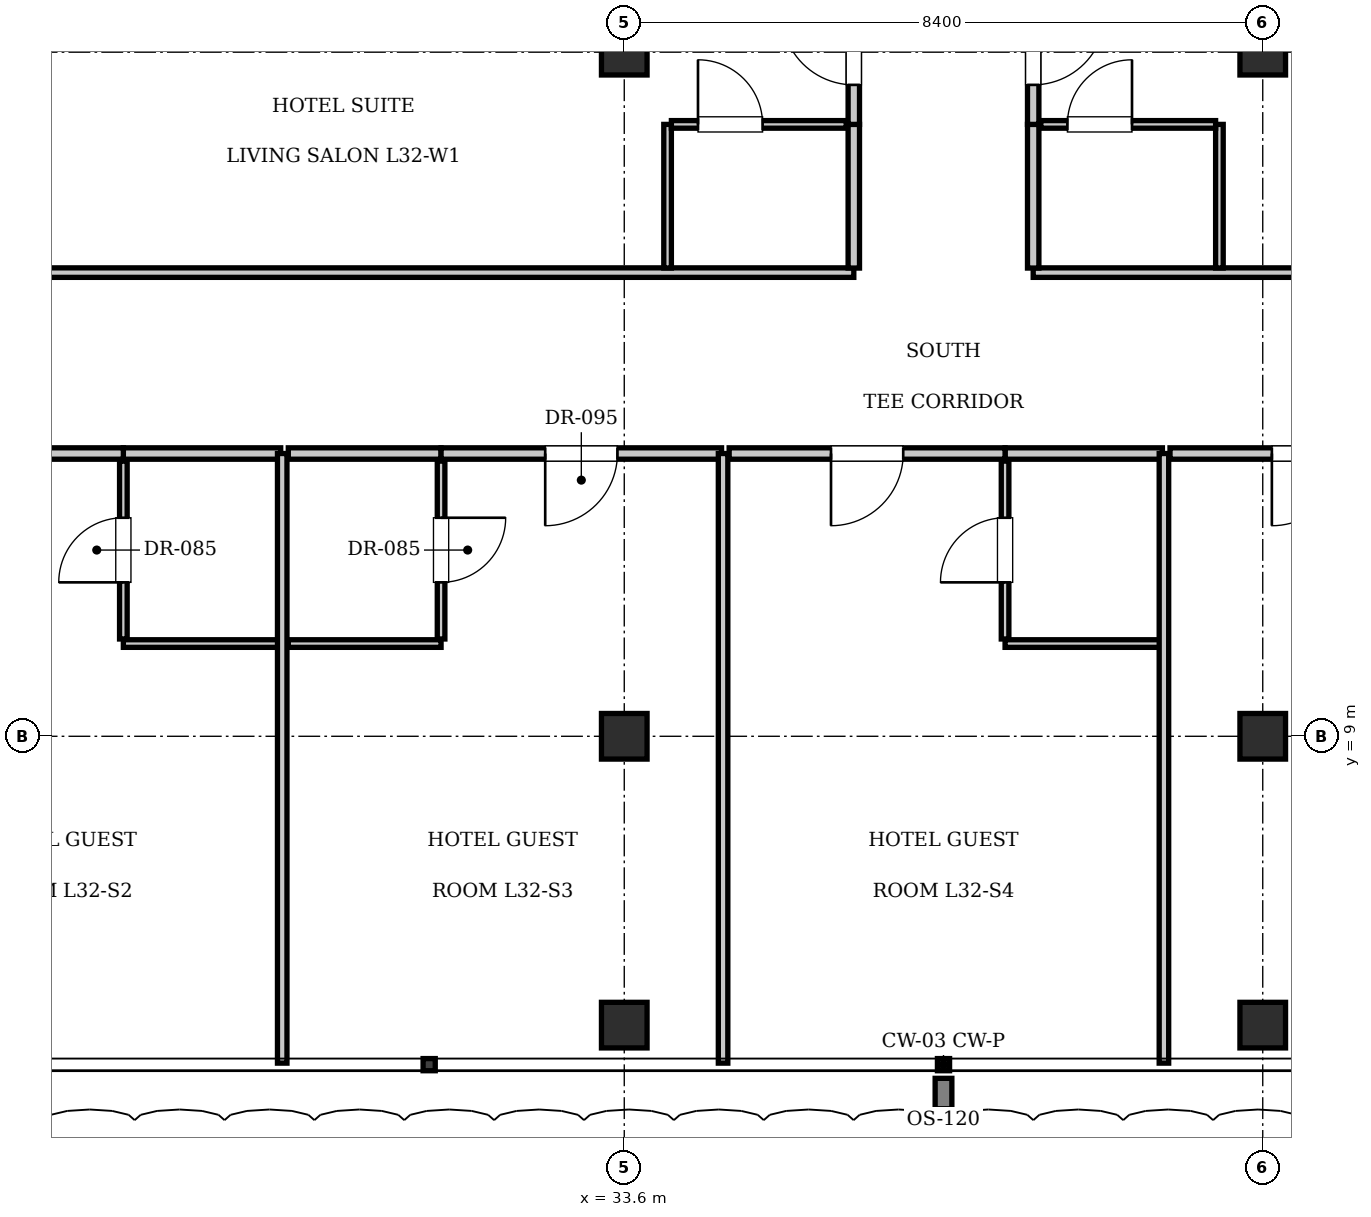
"""IFC4 building model, lengths in metres.
Left out: names, types, materials, properties, quantities, classifications, styles, units other than length and angle.
Written with IfcOpenShell. Run it as: python <this file> out.ifc"""

import sys

from ifc_helpers import new_model, si_unit, direction, frame, frame_2d, origin, origin_2d, place, context, subcontext, project, spatial, rectangle, i_section, extrude, element, fill, save


model = new_model("IFC4")
c1 = context("Model", 3, precision=1e-05, world=origin(), true_north=direction((0.0, 1.0)))
c2 = subcontext(c1, "Body", "Model", "MODEL_VIEW")
j1 = project(units=[si_unit("LENGTHUNIT", "METRE"), si_unit("PLANEANGLEUNIT", "RADIAN")], contexts=[c1])
p1 = place(None, origin())
s1 = spatial("IfcSite", under=j1, at=p1, CompositionType="ELEMENT")
p2 = place(p1, origin())
s2 = spatial("IfcBuilding", under=s1, at=p2, CompositionType="ELEMENT")
p3 = place(p2, frame((0.0, 0.0, 135.1)))
s3 = spatial("IfcBuildingStorey", under=s2, at=p3, CompositionType="ELEMENT", Elevation=135.1)
for number, where, z_axis, x_axis in (
    (1, (33.6, 9.0, 0.0), (0.0, 0.0, 1.0), (1.0, 0.0, 0.0)),
    (2, (42.0, 9.0, 0.0), (0.0, 0.0, 1.0), (1.0, 0.0, 0.0)),
    (3, (33.6, 18.0, 0.0), (0.0, 0.0, 1.0), (1.0, 0.0, 0.0)),
    (4, (42.0, 18.0, 0.0), (0.0, 0.0, 1.0), (1.0, 0.0, 0.0)),
    (5, (33.6, 5.2, 0.0), (0.0, 0.0, 1.0), (1.0, 0.0, 0.0)),
    (6, (42.0, 5.2, 0.0), (0.0, 0.0, 1.0), (1.0, 0.0, 0.0)),
):
    element("IfcColumn", number, at=place(p3, frame(where, z_axis=z_axis, x_axis=x_axis)), inside=s3, PredefinedType="COLUMN", context=c2, shape_type="SweptSolid", body=[
        extrude(i_section(OverallWidth=0.6, OverallDepth=0.6, WebThickness=0.025, FlangeThickness=0.038, at=origin_2d()), origin(), (0.0, 0.0, 1.0), 3.85),
    ])
p4 = place(p3, frame((27.01, 12.72, 0.0), z_axis=(0.0, 0.0, 1.0), x_axis=(1.0, 0.0, 0.0)))
e7 = element("IfcWall", 7, at=p4, inside=s3, PredefinedType="PARTITIONING", context=c2, shape_type="SweptSolid", body=[
    extrude(rectangle(XDim=2.07, YDim=0.15, at=frame_2d((1.035, 0.0))), origin(), (0.0, 0.0, 1.0), 3.61),
])
p5 = place(p3, frame((27.01, 10.22, 0.0), z_axis=(0.0, 0.0, 1.0), x_axis=(1.0, 0.0, 0.0)))
e8 = element("IfcWall", 8, at=p5, inside=s3, PredefinedType="PARTITIONING", context=c2, shape_type="SweptSolid", body=[
    extrude(rectangle(XDim=2.05, YDim=0.1, at=frame_2d((1.025, 0.0))), origin(), (0.0, 0.0, 1.0), 3.61),
])
p6 = place(p3, frame((27.01, 10.28, 0.0), z_axis=(0.0, 0.0, 1.0), x_axis=(0.0, 1.0, 0.0)))
e9 = element("IfcWall", 9, at=p6, inside=s3, PredefinedType="PARTITIONING", context=c2, shape_type="SweptSolid", body=[
    extrude(rectangle(XDim=2.34, YDim=0.1, at=frame_2d((1.17, 0.0))), origin(), (0.0, 0.0, 1.0), 3.61),
])
p7 = place(p6, frame((0.745, 0.0, 0.0)))
e10 = element("IfcOpeningElement", 10, at=p7, cuts=e9, PredefinedType="OPENING", context=c2, shape_type="SweptSolid", body=[
    extrude(rectangle(XDim=0.85, YDim=2.1, at=frame_2d((0.425, 1.05))), frame((0.0, 0.06, 0.0), z_axis=(0.0, -1.0, 0.0), x_axis=(1.0, 0.0, 0.0)), (0.0, 0.0, 1.0), 0.12),
])
p8 = place(p3, frame((23.38, 12.72, 0.0), z_axis=(0.0, 0.0, 1.0), x_axis=(1.0, 0.0, 0.0)))
e11 = element("IfcWall", 11, at=p8, inside=s3, PredefinedType="PARTITIONING", context=c2, shape_type="SweptSolid", body=[
    extrude(rectangle(XDim=3.63, YDim=0.15, at=frame_2d((1.815, 0.0))), origin(), (0.0, 0.0, 1.0), 3.61),
])
p9 = place(p8, frame((1.34, 0.0, 0.0)))
e12 = element("IfcOpeningElement", 12, at=p9, cuts=e11, PredefinedType="OPENING", context=c2, shape_type="SweptSolid", body=[
    extrude(rectangle(XDim=0.95, YDim=2.15, at=frame_2d((0.475, 1.075))), frame((0.0, 0.085, 0.0), z_axis=(0.0, -1.0, 0.0), x_axis=(1.0, 0.0, 0.0)), (0.0, 0.0, 1.0), 0.17),
])
p10 = place(p3, frame((29.1, 4.7, 0.0), z_axis=(0.0, 0.0, 1.0), x_axis=(0.0, 1.0, 0.0)))
e13 = element("IfcWall", 13, at=p10, inside=s3, PredefinedType="PARTITIONING", context=c2, shape_type="SweptSolid", body=[
    extrude(rectangle(XDim=8.02, YDim=0.125, at=frame_2d((4.01, 0.0))), origin(), (0.0, 0.0, 1.0), 3.61),
])
p11 = place(p3, frame((29.18, 12.72, 0.0), z_axis=(0.0, 0.0, 1.0), x_axis=(1.0, 0.0, 0.0)))
e14 = element("IfcWall", 14, at=p11, inside=s3, PredefinedType="PARTITIONING", context=c2, shape_type="SweptSolid", body=[
    extrude(rectangle(XDim=2.01, YDim=0.15, at=frame_2d((1.005, 0.0))), origin(), (0.0, 0.0, 1.0), 3.61),
])
p12 = place(p3, frame((29.18, 10.22, 0.0), z_axis=(0.0, 0.0, 1.0), x_axis=(1.0, 0.0, 0.0)))
e15 = element("IfcWall", 15, at=p12, inside=s3, PredefinedType="PARTITIONING", context=c2, shape_type="SweptSolid", body=[
    extrude(rectangle(XDim=2.01, YDim=0.1, at=frame_2d((1.005, 0.0))), origin(), (0.0, 0.0, 1.0), 3.61),
])
p13 = place(p3, frame((31.19, 10.28, 0.0), z_axis=(0.0, 0.0, 1.0), x_axis=(0.0, 1.0, 0.0)))
e16 = element("IfcWall", 16, at=p13, inside=s3, PredefinedType="PARTITIONING", context=c2, shape_type="SweptSolid", body=[
    extrude(rectangle(XDim=2.34, YDim=0.1, at=frame_2d((1.17, 0.0))), origin(), (0.0, 0.0, 1.0), 3.61),
])
p14 = place(p13, frame((0.745, 0.0, 0.0)))
e17 = element("IfcOpeningElement", 17, at=p14, cuts=e16, PredefinedType="OPENING", context=c2, shape_type="SweptSolid", body=[
    extrude(rectangle(XDim=0.85, YDim=2.1, at=frame_2d((0.425, 1.05))), frame((0.0, 0.06, 0.0), z_axis=(0.0, -1.0, 0.0), x_axis=(1.0, 0.0, 0.0)), (0.0, 0.0, 1.0), 0.12),
])
p15 = place(p3, frame((31.19, 12.72, 0.0), z_axis=(0.0, 0.0, 1.0), x_axis=(1.0, 0.0, 0.0)))
e18 = element("IfcWall", 18, at=p15, inside=s3, PredefinedType="PARTITIONING", context=c2, shape_type="SweptSolid", body=[
    extrude(rectangle(XDim=3.69, YDim=0.15, at=frame_2d((1.845, 0.0))), origin(), (0.0, 0.0, 1.0), 3.61),
])
p16 = place(p15, frame((1.37, 0.0, 0.0)))
e19 = element("IfcOpeningElement", 19, at=p16, cuts=e18, PredefinedType="OPENING", context=c2, shape_type="SweptSolid", body=[
    extrude(rectangle(XDim=0.95, YDim=2.15, at=frame_2d((0.475, 1.075))), frame((0.0, 0.085, 0.0), z_axis=(0.0, -1.0, 0.0), x_axis=(1.0, 0.0, 0.0)), (0.0, 0.0, 1.0), 0.17),
])
p17 = place(p3, frame((34.9, 4.7, 0.0), z_axis=(0.0, 0.0, 1.0), x_axis=(0.0, 1.0, 0.0)))
e20 = element("IfcWall", 20, at=p17, inside=s3, PredefinedType="PARTITIONING", context=c2, shape_type="SweptSolid", body=[
    extrude(rectangle(XDim=8.02, YDim=0.125, at=frame_2d((4.01, 0.0))), origin(), (0.0, 0.0, 1.0), 3.61),
])
p18 = place(p3, frame((38.61, 12.72, 0.0), z_axis=(0.0, 0.0, 1.0), x_axis=(1.0, 0.0, 0.0)))
e21 = element("IfcWall", 21, at=p18, inside=s3, PredefinedType="PARTITIONING", context=c2, shape_type="SweptSolid", body=[
    extrude(rectangle(XDim=2.07, YDim=0.15, at=frame_2d((1.035, 0.0))), origin(), (0.0, 0.0, 1.0), 3.61),
])
p19 = place(p3, frame((38.61, 10.22, 0.0), z_axis=(0.0, 0.0, 1.0), x_axis=(1.0, 0.0, 0.0)))
e22 = element("IfcWall", 22, at=p19, inside=s3, PredefinedType="PARTITIONING", context=c2, shape_type="SweptSolid", body=[
    extrude(rectangle(XDim=2.05, YDim=0.1, at=frame_2d((1.025, 0.0))), origin(), (0.0, 0.0, 1.0), 3.61),
])
p20 = place(p3, frame((38.61, 10.28, 0.0), z_axis=(0.0, 0.0, 1.0), x_axis=(0.0, 1.0, 0.0)))
e23 = element("IfcWall", 23, at=p20, inside=s3, PredefinedType="PARTITIONING", context=c2, shape_type="SweptSolid", body=[
    extrude(rectangle(XDim=2.34, YDim=0.1, at=frame_2d((1.17, 0.0))), origin(), (0.0, 0.0, 1.0), 3.61),
])
p21 = place(p20, frame((0.745, 0.0, 0.0)))
e24 = element("IfcOpeningElement", 24, at=p21, cuts=e23, PredefinedType="OPENING", context=c2, shape_type="SweptSolid", body=[
    extrude(rectangle(XDim=0.85, YDim=2.1, at=frame_2d((0.425, 1.05))), frame((0.0, 0.06, 0.0), z_axis=(0.0, -1.0, 0.0), x_axis=(1.0, 0.0, 0.0)), (0.0, 0.0, 1.0), 0.12),
])
p22 = place(p3, frame((34.98, 12.72, 0.0), z_axis=(0.0, 0.0, 1.0), x_axis=(1.0, 0.0, 0.0)))
e25 = element("IfcWall", 25, at=p22, inside=s3, PredefinedType="PARTITIONING", context=c2, shape_type="SweptSolid", body=[
    extrude(rectangle(XDim=3.63, YDim=0.15, at=frame_2d((1.815, 0.0))), origin(), (0.0, 0.0, 1.0), 3.61),
])
p23 = place(p22, frame((1.34, 0.0, 0.0)))
e26 = element("IfcOpeningElement", 26, at=p23, cuts=e25, PredefinedType="OPENING", context=c2, shape_type="SweptSolid", body=[
    extrude(rectangle(XDim=0.95, YDim=2.15, at=frame_2d((0.475, 1.075))), frame((0.0, 0.085, 0.0), z_axis=(0.0, -1.0, 0.0), x_axis=(1.0, 0.0, 0.0)), (0.0, 0.0, 1.0), 0.17),
])
p24 = place(p3, frame((40.7, 4.7, 0.0), z_axis=(0.0, 0.0, 1.0), x_axis=(0.0, 1.0, 0.0)))
e27 = element("IfcWall", 27, at=p24, inside=s3, PredefinedType="PARTITIONING", context=c2, shape_type="SweptSolid", body=[
    extrude(rectangle(XDim=8.02, YDim=0.125, at=frame_2d((4.01, 0.0))), origin(), (0.0, 0.0, 1.0), 3.61),
])
p25 = place(p3, frame((40.78, 12.72, 0.0), z_axis=(0.0, 0.0, 1.0), x_axis=(1.0, 0.0, 0.0)))
e28 = element("IfcWall", 28, at=p25, inside=s3, PredefinedType="PARTITIONING", context=c2, shape_type="SweptSolid", body=[
    extrude(rectangle(XDim=3.63, YDim=0.15, at=frame_2d((1.815, 0.0))), origin(), (0.0, 0.0, 1.0), 3.61),
])
p26 = place(p25, frame((1.34, 0.0, 0.0)))
e29 = element("IfcOpeningElement", 29, at=p26, cuts=e28, PredefinedType="OPENING", context=c2, shape_type="SweptSolid", body=[
    extrude(rectangle(XDim=0.95, YDim=2.15, at=frame_2d((0.475, 1.075))), frame((0.0, 0.085, 0.0), z_axis=(0.0, -1.0, 0.0), x_axis=(1.0, 0.0, 0.0)), (0.0, 0.0, 1.0), 0.17),
])
p27 = place(p3, frame((13.2, 15.1, 0.0), z_axis=(0.0, 0.0, 1.0), x_axis=(1.0, 0.0, 0.0)))
e30 = element("IfcWall", 30, at=p27, inside=s3, PredefinedType="PARTITIONING", context=c2, shape_type="SweptSolid", body=[
    extrude(rectangle(XDim=23.42, YDim=0.125, at=frame_2d((11.71, 0.0))), origin(), (0.0, 0.0, 1.0), 3.61),
])
p28 = place(p3, frame((38.98, 15.1, 0.0), z_axis=(0.0, 0.0, 1.0), x_axis=(1.0, 0.0, 0.0)))
e31 = element("IfcWall", 31, at=p28, inside=s3, PredefinedType="PARTITIONING", context=c2, shape_type="SweptSolid", body=[
    extrude(rectangle(XDim=23.42, YDim=0.125, at=frame_2d((11.71, 0.0))), origin(), (0.0, 0.0, 1.0), 3.61),
])
p29 = place(p3, frame((36.62, 15.16, 0.0), z_axis=(0.0, 0.0, 1.0), x_axis=(0.0, 1.0, 0.0)))
e32 = element("IfcWall", 32, at=p29, inside=s3, PredefinedType="PARTITIONING", context=c2, shape_type="SweptSolid", body=[
    extrude(rectangle(XDim=1.89, YDim=0.15, at=frame_2d((0.945, 0.0))), origin(), (0.0, 0.0, 1.0), 3.61),
])
p30 = place(p3, frame((36.62, 17.05, 0.0), z_axis=(0.0, 0.0, 1.0), x_axis=(0.0, 1.0, 0.0)))
e33 = element("IfcWall", 33, at=p30, inside=s3, PredefinedType="PARTITIONING", context=c2, shape_type="SweptSolid", body=[
    extrude(rectangle(XDim=1.99, YDim=0.15, at=frame_2d((0.995, 0.0))), origin(), (0.0, 0.0, 1.0), 3.61),
])
p31 = place(p30, frame((0.52, 0.0, 0.0)))
e34 = element("IfcOpeningElement", 34, at=p31, cuts=e33, PredefinedType="OPENING", context=c2, shape_type="SweptSolid", body=[
    extrude(rectangle(XDim=0.95, YDim=2.15, at=frame_2d((0.475, 1.075))), frame((0.0, 0.085, 0.0), z_axis=(0.0, -1.0, 0.0), x_axis=(1.0, 0.0, 0.0)), (0.0, 0.0, 1.0), 0.17),
])
p32 = place(p3, frame((34.17, 15.16, 0.0), z_axis=(0.0, 0.0, 1.0), x_axis=(0.0, 1.0, 0.0)))
e35 = element("IfcWall", 35, at=p32, inside=s3, PredefinedType="PARTITIONING", context=c2, shape_type="SweptSolid", body=[
    extrude(rectangle(XDim=1.89, YDim=0.1, at=frame_2d((0.945, 0.0))), origin(), (0.0, 0.0, 1.0), 3.61),
])
p33 = place(p3, frame((34.22, 17.05, 0.0), z_axis=(0.0, 0.0, 1.0), x_axis=(1.0, 0.0, 0.0)))
e36 = element("IfcWall", 36, at=p33, inside=s3, PredefinedType="PARTITIONING", context=c2, shape_type="SweptSolid", body=[
    extrude(rectangle(XDim=2.3, YDim=0.1, at=frame_2d((1.15, 0.0))), origin(), (0.0, 0.0, 1.0), 3.61),
])
p34 = place(p33, frame((0.35, 0.0, 0.0)))
e37 = element("IfcOpeningElement", 37, at=p34, cuts=e36, PredefinedType="OPENING", context=c2, shape_type="SweptSolid", body=[
    extrude(rectangle(XDim=0.85, YDim=2.1, at=frame_2d((0.425, 1.05))), frame((0.0, 0.06, 0.0), z_axis=(0.0, -1.0, 0.0), x_axis=(1.0, 0.0, 0.0)), (0.0, 0.0, 1.0), 0.12),
])
p35 = place(p3, frame((38.98, 15.16, 0.0), z_axis=(0.0, 0.0, 1.0), x_axis=(0.0, 1.0, 0.0)))
e38 = element("IfcWall", 38, at=p35, inside=s3, PredefinedType="PARTITIONING", context=c2, shape_type="SweptSolid", body=[
    extrude(rectangle(XDim=1.89, YDim=0.15, at=frame_2d((0.945, 0.0))), origin(), (0.0, 0.0, 1.0), 3.61),
])
p36 = place(p3, frame((38.98, 17.05, 0.0), z_axis=(0.0, 0.0, 1.0), x_axis=(0.0, 1.0, 0.0)))
e39 = element("IfcWall", 39, at=p36, inside=s3, PredefinedType="PARTITIONING", context=c2, shape_type="SweptSolid", body=[
    extrude(rectangle(XDim=1.99, YDim=0.15, at=frame_2d((0.995, 0.0))), origin(), (0.0, 0.0, 1.0), 3.61),
])
p37 = place(p36, frame((0.52, 0.0, 0.0)))
e40 = element("IfcOpeningElement", 40, at=p37, cuts=e39, PredefinedType="OPENING", context=c2, shape_type="SweptSolid", body=[
    extrude(rectangle(XDim=0.95, YDim=2.15, at=frame_2d((0.475, 1.075))), frame((0.0, 0.085, 0.0), z_axis=(0.0, -1.0, 0.0), x_axis=(1.0, 0.0, 0.0)), (0.0, 0.0, 1.0), 0.17),
])
p38 = place(p3, frame((41.43, 15.16, 0.0), z_axis=(0.0, 0.0, 1.0), x_axis=(0.0, 1.0, 0.0)))
e41 = element("IfcWall", 41, at=p38, inside=s3, PredefinedType="PARTITIONING", context=c2, shape_type="SweptSolid", body=[
    extrude(rectangle(XDim=1.89, YDim=0.1, at=frame_2d((0.945, 0.0))), origin(), (0.0, 0.0, 1.0), 3.61),
])
p39 = place(p3, frame((39.08, 17.05, 0.0), z_axis=(0.0, 0.0, 1.0), x_axis=(1.0, 0.0, 0.0)))
e42 = element("IfcWall", 42, at=p39, inside=s3, PredefinedType="PARTITIONING", context=c2, shape_type="SweptSolid", body=[
    extrude(rectangle(XDim=2.3, YDim=0.1, at=frame_2d((1.15, 0.0))), origin(), (0.0, 0.0, 1.0), 3.61),
])
p40 = place(p39, frame((0.35, 0.0, 0.0)))
e43 = element("IfcOpeningElement", 43, at=p40, cuts=e42, PredefinedType="OPENING", context=c2, shape_type="SweptSolid", body=[
    extrude(rectangle(XDim=0.85, YDim=2.1, at=frame_2d((0.425, 1.05))), frame((0.0, 0.06, 0.0), z_axis=(0.0, -1.0, 0.0), x_axis=(1.0, 0.0, 0.0)), (0.0, 0.0, 1.0), 0.12),
])
p41 = place(p7, origin())
e44 = element("IfcDoor", 44, at=p41, inside=s3, OperationType="SINGLE_SWING_LEFT", PredefinedType="DOOR", context=c2, shape_type="SweptSolid", body=[
    extrude(rectangle(XDim=0.85, YDim=2.1, at=frame_2d((0.425, 1.05))), frame((0.0, 0.025, 0.0), z_axis=(0.0, -1.0, 0.0), x_axis=(1.0, 0.0, 0.0)), (0.0, 0.0, 1.0), 0.05),
])
fill(e10, e44)
p42 = place(p14, frame((0.85, 0.0, 0.0), z_axis=(0.0, 0.0, 1.0), x_axis=(-1.0, 0.0, 0.0)))
e45 = element("IfcDoor", 45, at=p42, inside=s3, OperationType="SINGLE_SWING_LEFT", PredefinedType="DOOR", context=c2, shape_type="SweptSolid", body=[
    extrude(rectangle(XDim=0.85, YDim=2.1, at=frame_2d((0.425, 1.05))), frame((0.0, 0.025, 0.0), z_axis=(0.0, -1.0, 0.0), x_axis=(1.0, 0.0, 0.0)), (0.0, 0.0, 1.0), 0.05),
])
fill(e17, e45)
p43 = place(p16, frame((0.95, 0.0, 0.0), z_axis=(0.0, 0.0, 1.0), x_axis=(-1.0, 0.0, 0.0)))
e46 = element("IfcDoor", 46, at=p43, inside=s3, OperationType="SINGLE_SWING_RIGHT", PredefinedType="DOOR", context=c2, shape_type="SweptSolid", body=[
    extrude(rectangle(XDim=0.95, YDim=2.15, at=frame_2d((0.475, 1.075))), frame((0.0, 0.025, 0.0), z_axis=(0.0, -1.0, 0.0), x_axis=(1.0, 0.0, 0.0)), (0.0, 0.0, 1.0), 0.05),
])
fill(e19, e46)
p44 = place(p21, origin())
e47 = element("IfcDoor", 47, at=p44, inside=s3, OperationType="SINGLE_SWING_LEFT", PredefinedType="DOOR", context=c2, shape_type="SweptSolid", body=[
    extrude(rectangle(XDim=0.85, YDim=2.1, at=frame_2d((0.425, 1.05))), frame((0.0, 0.025, 0.0), z_axis=(0.0, -1.0, 0.0), x_axis=(1.0, 0.0, 0.0)), (0.0, 0.0, 1.0), 0.05),
])
fill(e24, e47)
p45 = place(p23, frame((0.95, 0.0, 0.0), z_axis=(0.0, 0.0, 1.0), x_axis=(-1.0, 0.0, 0.0)))
e48 = element("IfcDoor", 48, at=p45, inside=s3, OperationType="SINGLE_SWING_RIGHT", PredefinedType="DOOR", context=c2, shape_type="SweptSolid", body=[
    extrude(rectangle(XDim=0.95, YDim=2.15, at=frame_2d((0.475, 1.075))), frame((0.0, 0.025, 0.0), z_axis=(0.0, -1.0, 0.0), x_axis=(1.0, 0.0, 0.0)), (0.0, 0.0, 1.0), 0.05),
])
fill(e26, e48)
p46 = place(p26, frame((0.95, 0.0, 0.0), z_axis=(0.0, 0.0, 1.0), x_axis=(-1.0, 0.0, 0.0)))
e49 = element("IfcDoor", 49, at=p46, inside=s3, OperationType="SINGLE_SWING_RIGHT", PredefinedType="DOOR", context=c2, shape_type="SweptSolid", body=[
    extrude(rectangle(XDim=0.95, YDim=2.15, at=frame_2d((0.475, 1.075))), frame((0.0, 0.025, 0.0), z_axis=(0.0, -1.0, 0.0), x_axis=(1.0, 0.0, 0.0)), (0.0, 0.0, 1.0), 0.05),
])
fill(e29, e49)
p47 = place(p34, origin())
e50 = element("IfcDoor", 50, at=p47, inside=s3, OperationType="SINGLE_SWING_LEFT", PredefinedType="DOOR", context=c2, shape_type="SweptSolid", body=[
    extrude(rectangle(XDim=0.85, YDim=2.1, at=frame_2d((0.425, 1.05))), frame((0.0, 0.025, 0.0), z_axis=(0.0, -1.0, 0.0), x_axis=(1.0, 0.0, 0.0)), (0.0, 0.0, 1.0), 0.05),
])
fill(e37, e50)
p48 = place(p31, origin())
e51 = element("IfcDoor", 51, at=p48, inside=s3, OperationType="SINGLE_SWING_RIGHT", PredefinedType="DOOR", context=c2, shape_type="SweptSolid", body=[
    extrude(rectangle(XDim=0.95, YDim=2.15, at=frame_2d((0.475, 1.075))), frame((0.0, 0.025, 0.0), z_axis=(0.0, -1.0, 0.0), x_axis=(1.0, 0.0, 0.0)), (0.0, 0.0, 1.0), 0.05),
])
fill(e34, e51)
p49 = place(p40, origin())
e52 = element("IfcDoor", 52, at=p49, inside=s3, OperationType="SINGLE_SWING_RIGHT", PredefinedType="DOOR", context=c2, shape_type="SweptSolid", body=[
    extrude(rectangle(XDim=0.85, YDim=2.1, at=frame_2d((0.425, 1.05))), frame((0.0, 0.025, 0.0), z_axis=(0.0, -1.0, 0.0), x_axis=(1.0, 0.0, 0.0)), (0.0, 0.0, 1.0), 0.05),
])
fill(e43, e52)
p50 = place(p37, frame((0.95, 0.0, 0.0), z_axis=(0.0, 0.0, 1.0), x_axis=(-1.0, 0.0, 0.0)))
e53 = element("IfcDoor", 53, at=p50, inside=s3, OperationType="SINGLE_SWING_LEFT", PredefinedType="DOOR", context=c2, shape_type="SweptSolid", body=[
    extrude(rectangle(XDim=0.95, YDim=2.15, at=frame_2d((0.475, 1.075))), frame((0.0, 0.025, 0.0), z_axis=(0.0, -1.0, 0.0), x_axis=(1.0, 0.0, 0.0)), (0.0, 0.0, 1.0), 0.05),
])
fill(e40, e53)
save(model, sys.argv[1])
